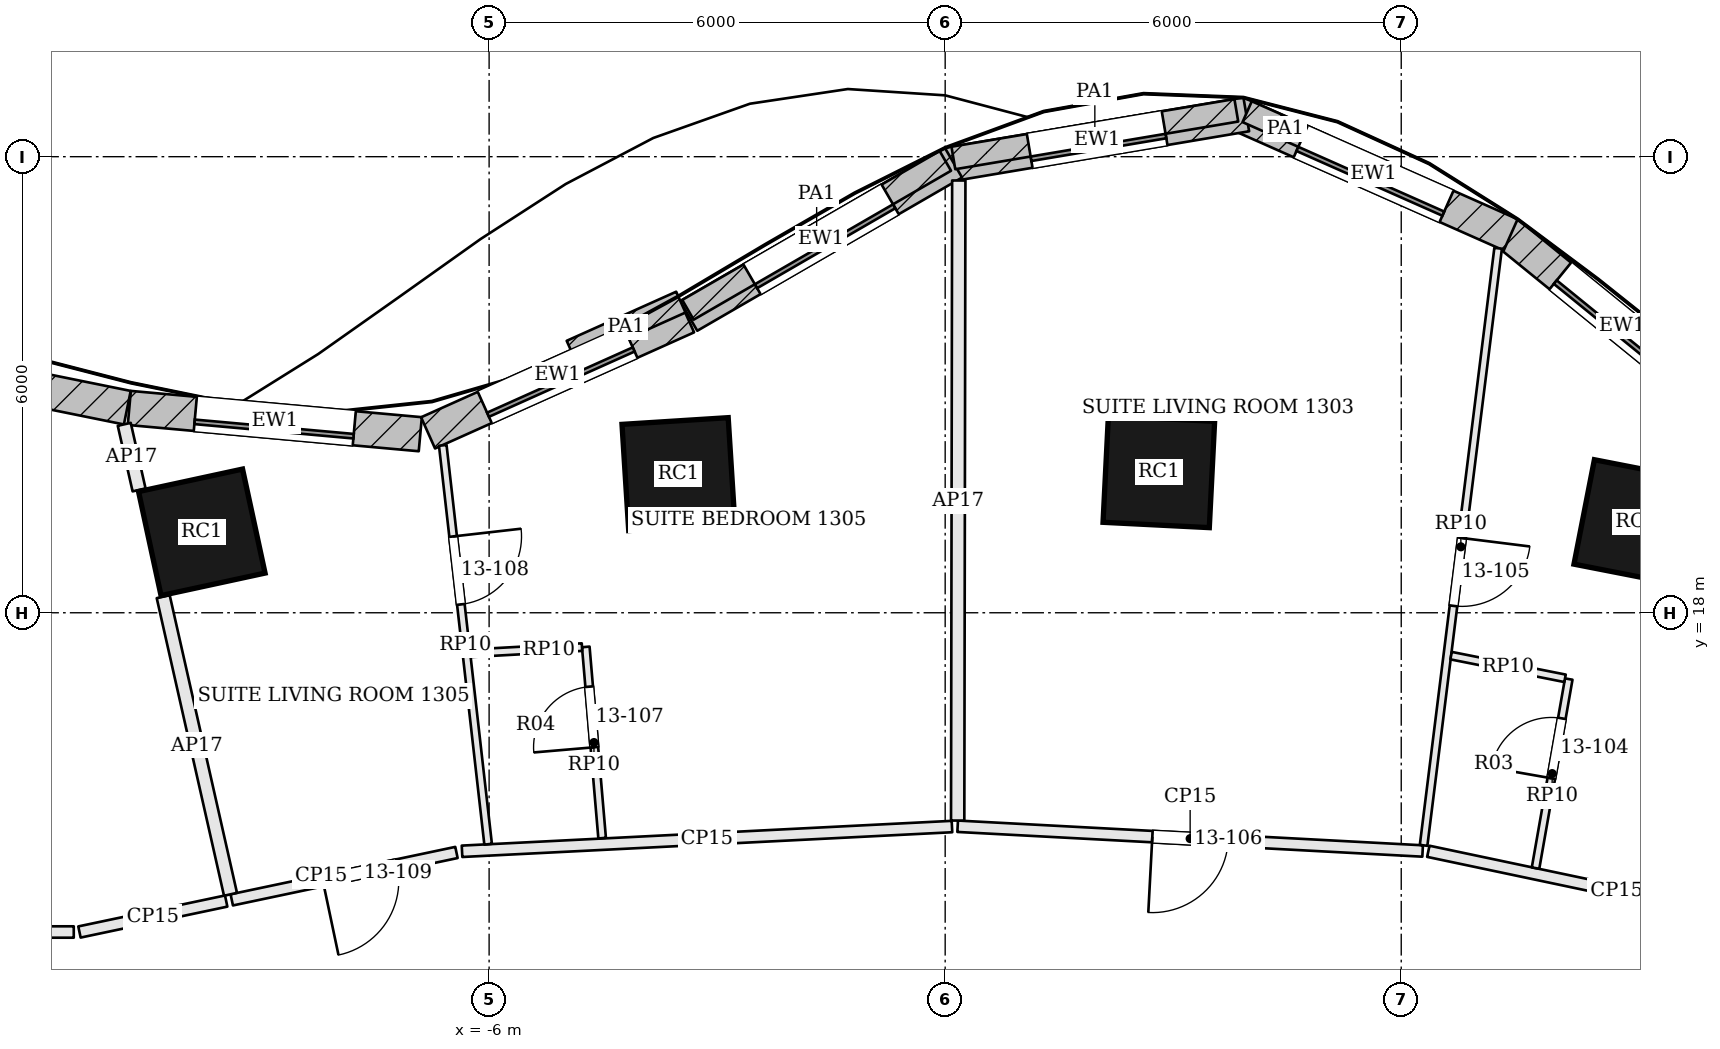
"""IFC4 building model, lengths in metres.
Left out: names, types, materials, properties, quantities, classifications, styles, units other than length and angle.
Written with IfcOpenShell. Run it as: python <this file> out.ifc"""

import sys

from ifc_helpers import new_model, si_unit, direction, frame, frame_2d, origin, origin_2d, place, context, subcontext, project, spatial, rectangle, extrude, element, fill, save


model = new_model("IFC4")
c1 = context("Model", 3, precision=1e-05, world=origin(), true_north=direction((0.0, 1.0)))
c2 = subcontext(c1, "Body", "Model", "MODEL_VIEW")
j1 = project(units=[si_unit("LENGTHUNIT", "METRE"), si_unit("PLANEANGLEUNIT", "RADIAN")], contexts=[c1])
p1 = place(None, origin())
s1 = spatial("IfcSite", under=j1, at=p1, CompositionType="ELEMENT")
p2 = place(p1, origin())
s2 = spatial("IfcBuilding", under=s1, at=p2, CompositionType="ELEMENT")
p3 = place(p2, frame((0.0, 0.0, 62.7)))
s3 = spatial("IfcBuildingStorey", under=s2, at=p3, CompositionType="ELEMENT", Elevation=62.7)
for number, where, z_axis, x_axis in (
    (1, (9.094, 19.192, 0.0), (0.0, 0.0, 1.0), (-0.981, 0.192, 0.0)),
    (2, (2.811, 19.854, 0.0), (0.0, 0.0, 1.0), (-0.999, 0.05, 0.0)),
    (3, (-3.509, 19.824, 0.0), (0.0, 0.0, 1.0), (-0.998, -0.063, 0.0)),
    (4, (-9.78, 19.058, 0.0), (0.0, 0.0, 1.0), (-0.977, -0.211, 0.0)),
):
    element("IfcColumn", number, at=place(p3, frame(where, z_axis=z_axis, x_axis=x_axis)), inside=s3, PredefinedType="COLUMN", context=c2, shape_type="SweptSolid", body=[
        extrude(rectangle(XDim=1.4, YDim=1.4, at=origin_2d()), origin(), (0.0, 0.0, 1.0), 3.6),
    ])
p4 = place(p3, frame((10.422, 20.539, 0.0), z_axis=(0.0, 0.0, 1.0), x_axis=(-0.775999170522, 0.63073392754, 0.0)))
e5 = element("IfcWall", 5, at=p4, inside=s3, PredefinedType="SOLIDWALL", context=c2, shape_type="SweptSolid", body=[
    extrude(rectangle(XDim=3.903, YDim=0.45, at=frame_2d((1.951, 0.0))), origin(), (0.0, 0.0, 1.0), 3.4),
])
p5 = place(p4, frame((0.901, 0.0, 0.9)))
e6 = element("IfcOpeningElement", 6, at=p5, cuts=e5, PredefinedType="OPENING", context=c2, shape_type="SweptSolid", body=[
    extrude(rectangle(XDim=2.1, YDim=2.0, at=frame_2d((1.05, 1.0))), frame((0.0, 0.235, 0.0), z_axis=(0.0, -1.0, 0.0), x_axis=(1.0, 0.0, 0.0)), (0.0, 0.0, 1.0), 0.47),
])
p6 = place(p3, frame((7.44, 22.972, 0.0), z_axis=(0.0, 0.0, 1.0), x_axis=(-0.914114918534, 0.405455195692, 0.0)))
e7 = element("IfcWall", 7, at=p6, inside=s3, PredefinedType="SOLIDWALL", context=c2, shape_type="SweptSolid", body=[
    extrude(rectangle(XDim=3.946, YDim=0.45, at=frame_2d((1.973, 0.0))), origin(), (0.0, 0.0, 1.0), 3.4),
])
p7 = place(p6, frame((0.923, 0.0, 0.9)))
e8 = element("IfcOpeningElement", 8, at=p7, cuts=e7, PredefinedType="OPENING", context=c2, shape_type="SweptSolid", body=[
    extrude(rectangle(XDim=2.1, YDim=2.0, at=frame_2d((1.05, 1.0))), frame((0.0, 0.235, 0.0), z_axis=(0.0, -1.0, 0.0), x_axis=(1.0, 0.0, 0.0)), (0.0, 0.0, 1.0), 0.47),
])
p8 = place(p3, frame((3.961, 24.556, 0.0), z_axis=(0.0, 0.0, 1.0), x_axis=(-0.986102211406, -0.166139786505, 0.0)))
e9 = element("IfcWall", 9, at=p8, inside=s3, PredefinedType="SOLIDWALL", context=c2, shape_type="SweptSolid", body=[
    extrude(rectangle(XDim=3.979, YDim=0.45, at=frame_2d((1.99, 0.0))), origin(), (0.0, 0.0, 1.0), 3.4),
])
p9 = place(p8, frame((1.09, 0.0, 0.9)))
e10 = element("IfcOpeningElement", 10, at=p9, cuts=e9, PredefinedType="OPENING", context=c2, shape_type="SweptSolid", body=[
    extrude(rectangle(XDim=1.8, YDim=2.0, at=frame_2d((0.9, 1.0))), frame((0.0, 0.235, 0.0), z_axis=(0.0, -1.0, 0.0), x_axis=(1.0, 0.0, 0.0)), (0.0, 0.0, 1.0), 0.47),
])
p10 = place(p3, frame((0.109, 23.92, 0.0), z_axis=(0.0, 0.0, 1.0), x_axis=(-0.865557769603, -0.500809092848, 0.0)))
e11 = element("IfcWall", 11, at=p10, inside=s3, PredefinedType="SOLIDWALL", context=c2, shape_type="SweptSolid", body=[
    extrude(rectangle(XDim=4.025, YDim=0.45, at=frame_2d((2.012, 0.0))), origin(), (0.0, 0.0, 1.0), 3.4),
])
p11 = place(p10, frame((0.962, 0.0, 0.9)))
e12 = element("IfcOpeningElement", 12, at=p11, cuts=e11, PredefinedType="OPENING", context=c2, shape_type="SweptSolid", body=[
    extrude(rectangle(XDim=2.1, YDim=2.0, at=frame_2d((1.05, 1.0))), frame((0.0, 0.235, 0.0), z_axis=(0.0, -1.0, 0.0), x_axis=(1.0, 0.0, 0.0)), (0.0, 0.0, 1.0), 0.47),
])
p12 = place(p3, frame((-3.395, 21.894, 0.0), z_axis=(0.0, 0.0, 1.0), x_axis=(-0.912496703183, -0.409084058208, 0.0)))
e13 = element("IfcWall", 13, at=p12, inside=s3, PredefinedType="SOLIDWALL", context=c2, shape_type="SweptSolid", body=[
    extrude(rectangle(XDim=3.735, YDim=0.45, at=frame_2d((1.867, 0.0))), origin(), (0.0, 0.0, 1.0), 3.4),
])
p13 = place(p12, frame((0.817, 0.0, 0.9)))
e14 = element("IfcOpeningElement", 14, at=p13, cuts=e13, PredefinedType="OPENING", context=c2, shape_type="SweptSolid", body=[
    extrude(rectangle(XDim=2.1, YDim=2.0, at=frame_2d((1.05, 1.0))), frame((0.0, 0.235, 0.0), z_axis=(0.0, -1.0, 0.0), x_axis=(1.0, 0.0, 0.0)), (0.0, 0.0, 1.0), 0.47),
])
p14 = place(p3, frame((-6.906, 20.349, 0.0), z_axis=(0.0, 0.0, 1.0), x_axis=(-0.995947174038, 0.089940127451, 0.0)))
e15 = element("IfcWall", 15, at=p14, inside=s3, PredefinedType="SOLIDWALL", context=c2, shape_type="SweptSolid", body=[
    extrude(rectangle(XDim=3.844, YDim=0.45, at=frame_2d((1.922, 0.0))), origin(), (0.0, 0.0, 1.0), 3.4),
])
p15 = place(p14, frame((0.872, 0.0, 0.9)))
e16 = element("IfcOpeningElement", 16, at=p15, cuts=e15, PredefinedType="OPENING", context=c2, shape_type="SweptSolid", body=[
    extrude(rectangle(XDim=2.1, YDim=2.0, at=frame_2d((1.05, 1.0))), frame((0.0, 0.235, 0.0), z_axis=(0.0, -1.0, 0.0), x_axis=(1.0, 0.0, 0.0)), (0.0, 0.0, 1.0), 0.47),
])
p16 = place(p3, frame((-10.76, 20.698, 0.0), z_axis=(0.0, 0.0, 1.0), x_axis=(-0.980072890434, 0.198638187256, 0.0)))
e17 = element("IfcWall", 17, at=p16, inside=s3, PredefinedType="SOLIDWALL", context=c2, shape_type="SweptSolid", body=[
    extrude(rectangle(XDim=5.36, YDim=0.45, at=frame_2d((2.68, 0.0))), origin(), (0.0, 0.0, 1.0), 3.4),
])
p17 = place(p16, frame((1.63, 0.0, 0.9)))
e18 = element("IfcOpeningElement", 18, at=p17, cuts=e17, PredefinedType="OPENING", context=c2, shape_type="SweptSolid", body=[
    extrude(rectangle(XDim=2.1, YDim=2.0, at=frame_2d((1.05, 1.0))), frame((0.0, 0.235, 0.0), z_axis=(0.0, -1.0, 0.0), x_axis=(1.0, 0.0, 0.0)), (0.0, 0.0, 1.0), 0.47),
])
p18 = place(p3, frame((4.979, 24.146, 3.6), z_axis=(0.0, 0.0, 1.0), x_axis=(-0.91414047558, 0.405397571412, 0.0)))
e19 = element("IfcWall", 19, at=p18, inside=s3, PredefinedType="PARAPET", context=c2, shape_type="SweptSolid", body=[
    extrude(rectangle(XDim=1.101, YDim=0.3, at=frame_2d((0.55, 0.0))), origin(), (0.0, 0.0, 1.0), 1.1),
])
p19 = place(p3, frame((3.83, 24.61, 3.6), z_axis=(0.0, 0.0, 1.0), x_axis=(-0.986111051666, -0.166087307712, 0.0)))
e20 = element("IfcWall", 20, at=p19, inside=s3, PredefinedType="PARAPET", context=c2, shape_type="SweptSolid", body=[
    extrude(rectangle(XDim=3.775, YDim=0.3, at=frame_2d((1.887, 0.0))), origin(), (0.0, 0.0, 1.0), 1.1),
])
p20 = place(p3, frame((0.002, 23.945, 3.6), z_axis=(0.0, 0.0, 1.0), x_axis=(-0.865550152763, -0.500822256945, 0.0)))
e21 = element("IfcWall", 21, at=p20, inside=s3, PredefinedType="PARAPET", context=c2, shape_type="SweptSolid", body=[
    extrude(rectangle(XDim=3.913, YDim=0.3, at=frame_2d((1.956, 0.0))), origin(), (0.0, 0.0, 1.0), 1.1),
])
p21 = place(p3, frame((-3.478, 22.087, 3.6), z_axis=(0.0, 0.0, 1.0), x_axis=(-0.91246752391, -0.409149138835, 0.0)))
e22 = element("IfcWall", 22, at=p21, inside=s3, PredefinedType="PARAPET", context=c2, shape_type="SweptSolid", body=[
    extrude(rectangle(XDim=1.579, YDim=0.3, at=frame_2d((0.79, 0.0))), origin(), (0.0, 0.0, 1.0), 1.1),
])
p22 = place(p3, frame((11.316, 13.815, 0.0), z_axis=(0.0, 0.0, 1.0), x_axis=(-0.978460774853, 0.206432827025, 0.0)))
e23 = element("IfcWall", 23, at=p22, inside=s3, PredefinedType="PARTITIONING", context=c2, shape_type="SweptSolid", body=[
    extrude(rectangle(XDim=5.069, YDim=0.15, at=frame_2d((2.534, 0.0))), origin(), (0.0, 0.0, 1.0), 2.68),
])
p23 = place(p3, frame((6.281, 14.866, 0.0), z_axis=(0.0, 0.0, 1.0), x_axis=(-0.998587832803, 0.053125701673, 0.0)))
e24 = element("IfcWall", 24, at=p23, inside=s3, PredefinedType="PARTITIONING", context=c2, shape_type="SweptSolid", body=[
    extrude(rectangle(XDim=6.126, YDim=0.15, at=frame_2d((3.063, 0.0))), origin(), (0.0, 0.0, 1.0), 2.68),
])
p24 = place(p23, frame((2.561, 0.0, 0.0)))
e25 = element("IfcOpeningElement", 25, at=p24, cuts=e24, PredefinedType="OPENING", context=c2, shape_type="SweptSolid", body=[
    extrude(rectangle(XDim=1.0, YDim=2.1, at=frame_2d((0.5, 1.05))), frame((0.0, 0.085, 0.0), z_axis=(0.0, -1.0, 0.0), x_axis=(1.0, 0.0, 0.0)), (0.0, 0.0, 1.0), 0.17),
])
p25 = place(p3, frame((0.179, 23.687, 0.0), z_axis=(0.0, 0.0, 1.0), x_axis=(-0.001768574544, -0.999998436071, 0.0)))
e26 = element("IfcWall", 26, at=p25, inside=s3, PredefinedType="PARTITIONING", context=c2, shape_type="SweptSolid", body=[
    extrude(rectangle(XDim=8.421, YDim=0.175, at=frame_2d((4.21, 0.0))), origin(), (0.0, 0.0, 1.0), 2.68),
])
p26 = place(p3, frame((0.089, 15.188, 0.0), z_axis=(0.0, 0.0, 1.0), x_axis=(-0.998725880164, -0.050464009853, 0.0)))
e27 = element("IfcWall", 27, at=p26, inside=s3, PredefinedType="PARTITIONING", context=c2, shape_type="SweptSolid", body=[
    extrude(rectangle(XDim=6.454, YDim=0.15, at=frame_2d((3.227, 0.0))), origin(), (0.0, 0.0, 1.0), 2.68),
])
p27 = place(p3, frame((-6.43, 14.846, 0.0), z_axis=(0.0, 0.0, 1.0), x_axis=(-0.978469112666, -0.206393303085, 0.0)))
e28 = element("IfcWall", 28, at=p27, inside=s3, PredefinedType="PARTITIONING", context=c2, shape_type="SweptSolid", body=[
    extrude(rectangle(XDim=3.021, YDim=0.15, at=frame_2d((1.51, 0.0))), origin(), (0.0, 0.0, 1.0), 2.68),
])
p28 = place(p27, frame((0.797, 0.0, 0.0)))
e29 = element("IfcOpeningElement", 29, at=p28, cuts=e28, PredefinedType="OPENING", context=c2, shape_type="SweptSolid", body=[
    extrude(rectangle(XDim=1.0, YDim=2.1, at=frame_2d((0.5, 1.05))), frame((0.0, 0.085, 0.0), z_axis=(0.0, -1.0, 0.0), x_axis=(1.0, 0.0, 0.0)), (0.0, 0.0, 1.0), 0.17),
])
p29 = place(p3, frame((-10.8, 20.479, 0.0), z_axis=(0.0, 0.0, 1.0), x_axis=(0.220786026072, -0.975322270171, 0.0)))
e30 = element("IfcWall", 30, at=p29, inside=s3, PredefinedType="PARTITIONING", context=c2, shape_type="SweptSolid", body=[
    extrude(rectangle(XDim=0.885, YDim=0.175, at=frame_2d((0.442, 0.0))), origin(), (0.0, 0.0, 1.0), 2.68),
])
p30 = place(p3, frame((-10.288, 18.211, 0.0), z_axis=(0.0, 0.0, 1.0), x_axis=(0.220522195693, -0.975381956572, 0.0)))
e31 = element("IfcWall", 31, at=p30, inside=s3, PredefinedType="PARTITIONING", context=c2, shape_type="SweptSolid", body=[
    extrude(rectangle(XDim=4.014, YDim=0.175, at=frame_2d((2.007, 0.0))), origin(), (0.0, 0.0, 1.0), 2.68),
])
p31 = place(p3, frame((-9.459, 14.207, 0.0), z_axis=(0.0, 0.0, 1.0), x_axis=(-0.978460400771, -0.206434600112, 0.0)))
e32 = element("IfcWall", 32, at=p31, inside=s3, PredefinedType="PARTITIONING", context=c2, shape_type="SweptSolid", body=[
    extrude(rectangle(XDim=1.973, YDim=0.15, at=frame_2d((0.986, 0.0))), origin(), (0.0, 0.0, 1.0), 2.68),
])
p32 = place(p3, frame((-11.464, 13.8, 0.0), z_axis=(0.0, 0.0, 1.0), x_axis=(-1.0, 0.0, 0.0)))
e33 = element("IfcWall", 33, at=p32, inside=s3, PredefinedType="PARTITIONING", context=c2, shape_type="SweptSolid", body=[
    extrude(rectangle(XDim=3.336, YDim=0.15, at=frame_2d((1.668, 0.0))), origin(), (0.0, 0.0, 1.0), 2.68),
])
p33 = place(p32, frame((1.0, 0.0, 0.0)))
e34 = element("IfcOpeningElement", 34, at=p33, cuts=e33, PredefinedType="OPENING", context=c2, shape_type="SweptSolid", body=[
    extrude(rectangle(XDim=1.8, YDim=2.1, at=frame_2d((0.9, 1.05))), frame((0.0, 0.085, 0.0), z_axis=(0.0, -1.0, 0.0), x_axis=(1.0, 0.0, 0.0)), (0.0, 0.0, 1.0), 0.17),
])
p34 = place(p3, frame((7.275, 22.795, 0.0), z_axis=(0.0, 0.0, 1.0), x_axis=(-0.123890489741, -0.992295896672, 0.0)))
e35 = element("IfcWall", 35, at=p34, inside=s3, PredefinedType="PARTITIONING", context=c2, shape_type="SweptSolid", body=[
    extrude(rectangle(XDim=7.916, YDim=0.1, at=frame_2d((3.958, 0.0))), origin(), (0.0, 0.0, 1.0), 2.68),
])
p35 = place(p34, frame((3.841, 0.0, 0.0)))
e36 = element("IfcOpeningElement", 36, at=p35, cuts=e35, PredefinedType="OPENING", context=c2, shape_type="SweptSolid", body=[
    extrude(rectangle(XDim=0.9, YDim=2.4, at=frame_2d((0.45, 1.2))), frame((0.0, 0.06, 0.0), z_axis=(0.0, -1.0, 0.0), x_axis=(1.0, 0.0, 0.0)), (0.0, 0.0, 1.0), 0.12),
])
p36 = place(p3, frame((7.767, 14.641, 0.0), z_axis=(0.0, 0.0, 1.0), x_axis=(0.172985442563, 0.984924381189, 0.0)))
e37 = element("IfcWall", 37, at=p36, inside=s3, PredefinedType="PARTITIONING", context=c2, shape_type="SweptSolid", body=[
    extrude(rectangle(XDim=2.525, YDim=0.1, at=frame_2d((1.262, 0.0))), origin(), (0.0, 0.0, 1.0), 2.68),
])
p37 = place(p36, frame((1.2, 0.0, 0.0)))
e38 = element("IfcOpeningElement", 38, at=p37, cuts=e37, PredefinedType="OPENING", context=c2, shape_type="SweptSolid", body=[
    extrude(rectangle(XDim=0.8, YDim=2.1, at=frame_2d((0.4, 1.05))), frame((0.0, 0.06, 0.0), z_axis=(0.0, -1.0, 0.0), x_axis=(1.0, 0.0, 0.0)), (0.0, 0.0, 1.0), 0.12),
])
p38 = place(p3, frame((8.155, 17.137, 0.0), z_axis=(0.0, 0.0, 1.0), x_axis=(-0.980758463285, 0.195225092382, 0.0)))
e39 = element("IfcWall", 39, at=p38, inside=s3, PredefinedType="PARTITIONING", context=c2, shape_type="SweptSolid", body=[
    extrude(rectangle(XDim=1.528, YDim=0.1, at=frame_2d((0.764, 0.0))), origin(), (0.0, 0.0, 1.0), 2.68),
])
p39 = place(p3, frame((-6.61, 20.202, 0.0), z_axis=(0.0, 0.0, 1.0), x_axis=(0.113028971682, -0.993591692578, 0.0)))
e40 = element("IfcWall", 40, at=p39, inside=s3, PredefinedType="PARTITIONING", context=c2, shape_type="SweptSolid", body=[
    extrude(rectangle(XDim=5.281, YDim=0.1, at=frame_2d((2.641, 0.0))), origin(), (0.0, 0.0, 1.0), 2.68),
])
p40 = place(p39, frame((1.206, 0.0, 0.0)))
e41 = element("IfcOpeningElement", 41, at=p40, cuts=e40, PredefinedType="OPENING", context=c2, shape_type="SweptSolid", body=[
    extrude(rectangle(XDim=0.9, YDim=2.4, at=frame_2d((0.45, 1.2))), frame((0.0, 0.06, 0.0), z_axis=(0.0, -1.0, 0.0), x_axis=(1.0, 0.0, 0.0)), (0.0, 0.0, 1.0), 0.12),
])
p41 = place(p3, frame((-4.513, 15.035, 0.0), z_axis=(0.0, 0.0, 1.0), x_axis=(-0.085277735772, 0.996357218964, 0.0)))
e42 = element("IfcWall", 42, at=p41, inside=s3, PredefinedType="PARTITIONING", context=c2, shape_type="SweptSolid", body=[
    extrude(rectangle(XDim=2.525, YDim=0.1, at=frame_2d((1.263, 0.0))), origin(), (0.0, 0.0, 1.0), 2.68),
])
p42 = place(p41, frame((1.2, 0.0, 0.0)))
e43 = element("IfcOpeningElement", 43, at=p42, cuts=e42, PredefinedType="OPENING", context=c2, shape_type="SweptSolid", body=[
    extrude(rectangle(XDim=0.8, YDim=2.1, at=frame_2d((0.4, 1.05))), frame((0.0, 0.06, 0.0), z_axis=(0.0, -1.0, 0.0), x_axis=(1.0, 0.0, 0.0)), (0.0, 0.0, 1.0), 0.12),
])
p43 = place(p3, frame((-4.778, 17.548, 0.0), z_axis=(0.0, 0.0, 1.0), x_axis=(-0.998474099217, -0.055222035383, 0.0)))
e44 = element("IfcWall", 44, at=p43, inside=s3, PredefinedType="PARTITIONING", context=c2, shape_type="SweptSolid", body=[
    extrude(rectangle(XDim=1.472, YDim=0.1, at=frame_2d((0.736, 0.0))), origin(), (0.0, 0.0, 1.0), 2.68),
])
p44 = place(p5, origin())
e45 = element("IfcWindow", 45, at=p44, inside=s3, PartitioningType="SINGLE_PANEL", PredefinedType="WINDOW", context=c2, shape_type="SweptSolid", body=[
    extrude(rectangle(XDim=2.1, YDim=2.0, at=frame_2d((1.05, 1.0))), frame((0.0, 0.135, 0.0), z_axis=(0.0, -1.0, 0.0), x_axis=(1.0, 0.0, 0.0)), (0.0, 0.0, 1.0), 0.06),
])
fill(e6, e45)
p45 = place(p7, origin())
e46 = element("IfcWindow", 46, at=p45, inside=s3, PartitioningType="SINGLE_PANEL", PredefinedType="WINDOW", context=c2, shape_type="SweptSolid", body=[
    extrude(rectangle(XDim=2.1, YDim=2.0, at=frame_2d((1.05, 1.0))), frame((0.0, 0.135, 0.0), z_axis=(0.0, -1.0, 0.0), x_axis=(1.0, 0.0, 0.0)), (0.0, 0.0, 1.0), 0.06),
])
fill(e8, e46)
p46 = place(p9, origin())
e47 = element("IfcWindow", 47, at=p46, inside=s3, PartitioningType="SINGLE_PANEL", PredefinedType="WINDOW", context=c2, shape_type="SweptSolid", body=[
    extrude(rectangle(XDim=1.8, YDim=2.0, at=frame_2d((0.9, 1.0))), frame((0.0, 0.135, 0.0), z_axis=(0.0, -1.0, 0.0), x_axis=(1.0, 0.0, 0.0)), (0.0, 0.0, 1.0), 0.06),
])
fill(e10, e47)
p47 = place(p11, origin())
e48 = element("IfcWindow", 48, at=p47, inside=s3, PartitioningType="SINGLE_PANEL", PredefinedType="WINDOW", context=c2, shape_type="SweptSolid", body=[
    extrude(rectangle(XDim=2.1, YDim=2.0, at=frame_2d((1.05, 1.0))), frame((0.0, 0.135, 0.0), z_axis=(0.0, -1.0, 0.0), x_axis=(1.0, 0.0, 0.0)), (0.0, 0.0, 1.0), 0.06),
])
fill(e12, e48)
p48 = place(p13, origin())
e49 = element("IfcWindow", 49, at=p48, inside=s3, PartitioningType="SINGLE_PANEL", PredefinedType="WINDOW", context=c2, shape_type="SweptSolid", body=[
    extrude(rectangle(XDim=2.1, YDim=2.0, at=frame_2d((1.05, 1.0))), frame((0.0, 0.135, 0.0), z_axis=(0.0, -1.0, 0.0), x_axis=(1.0, 0.0, 0.0)), (0.0, 0.0, 1.0), 0.06),
])
fill(e14, e49)
p49 = place(p15, origin())
e50 = element("IfcWindow", 50, at=p49, inside=s3, PartitioningType="SINGLE_PANEL", PredefinedType="WINDOW", context=c2, shape_type="SweptSolid", body=[
    extrude(rectangle(XDim=2.1, YDim=2.0, at=frame_2d((1.05, 1.0))), frame((0.0, 0.135, 0.0), z_axis=(0.0, -1.0, 0.0), x_axis=(1.0, 0.0, 0.0)), (0.0, 0.0, 1.0), 0.06),
])
fill(e16, e50)
p50 = place(p37, origin())
e51 = element("IfcDoor", 51, at=p50, inside=s3, OperationType="SINGLE_SWING_LEFT", PredefinedType="DOOR", context=c2, shape_type="SweptSolid", body=[
    extrude(rectangle(XDim=0.8, YDim=2.1, at=frame_2d((0.4, 1.05))), frame((0.0, 0.025, 0.0), z_axis=(0.0, -1.0, 0.0), x_axis=(1.0, 0.0, 0.0)), (0.0, 0.0, 1.0), 0.05),
])
fill(e38, e51)
p51 = place(p35, origin())
e52 = element("IfcDoor", 52, at=p51, inside=s3, OperationType="SINGLE_SWING_LEFT", PredefinedType="DOOR", context=c2, shape_type="SweptSolid", body=[
    extrude(rectangle(XDim=0.9, YDim=2.4, at=frame_2d((0.45, 1.2))), frame((0.0, 0.025, 0.0), z_axis=(0.0, -1.0, 0.0), x_axis=(1.0, 0.0, 0.0)), (0.0, 0.0, 1.0), 0.05),
])
fill(e36, e52)
p52 = place(p24, origin())
e53 = element("IfcDoor", 53, at=p52, inside=s3, OperationType="SINGLE_SWING_RIGHT", PredefinedType="DOOR", context=c2, shape_type="SweptSolid", body=[
    extrude(rectangle(XDim=1.0, YDim=2.1, at=frame_2d((0.5, 1.05))), frame((0.0, 0.025, 0.0), z_axis=(0.0, -1.0, 0.0), x_axis=(1.0, 0.0, 0.0)), (0.0, 0.0, 1.0), 0.05),
])
fill(e25, e53)
p53 = place(p42, origin())
e54 = element("IfcDoor", 54, at=p53, inside=s3, OperationType="SINGLE_SWING_LEFT", PredefinedType="DOOR", context=c2, shape_type="SweptSolid", body=[
    extrude(rectangle(XDim=0.8, YDim=2.1, at=frame_2d((0.4, 1.05))), frame((0.0, 0.025, 0.0), z_axis=(0.0, -1.0, 0.0), x_axis=(1.0, 0.0, 0.0)), (0.0, 0.0, 1.0), 0.05),
])
fill(e43, e54)
p54 = place(p40, origin())
e55 = element("IfcDoor", 55, at=p54, inside=s3, OperationType="SINGLE_SWING_LEFT", PredefinedType="DOOR", context=c2, shape_type="SweptSolid", body=[
    extrude(rectangle(XDim=0.9, YDim=2.4, at=frame_2d((0.45, 1.2))), frame((0.0, 0.025, 0.0), z_axis=(0.0, -1.0, 0.0), x_axis=(1.0, 0.0, 0.0)), (0.0, 0.0, 1.0), 0.05),
])
fill(e41, e55)
p55 = place(p28, origin())
e56 = element("IfcDoor", 56, at=p55, inside=s3, OperationType="SINGLE_SWING_RIGHT", PredefinedType="DOOR", context=c2, shape_type="SweptSolid", body=[
    extrude(rectangle(XDim=1.0, YDim=2.1, at=frame_2d((0.5, 1.05))), frame((0.0, 0.025, 0.0), z_axis=(0.0, -1.0, 0.0), x_axis=(1.0, 0.0, 0.0)), (0.0, 0.0, 1.0), 0.05),
])
fill(e29, e56)
save(model, sys.argv[1])
